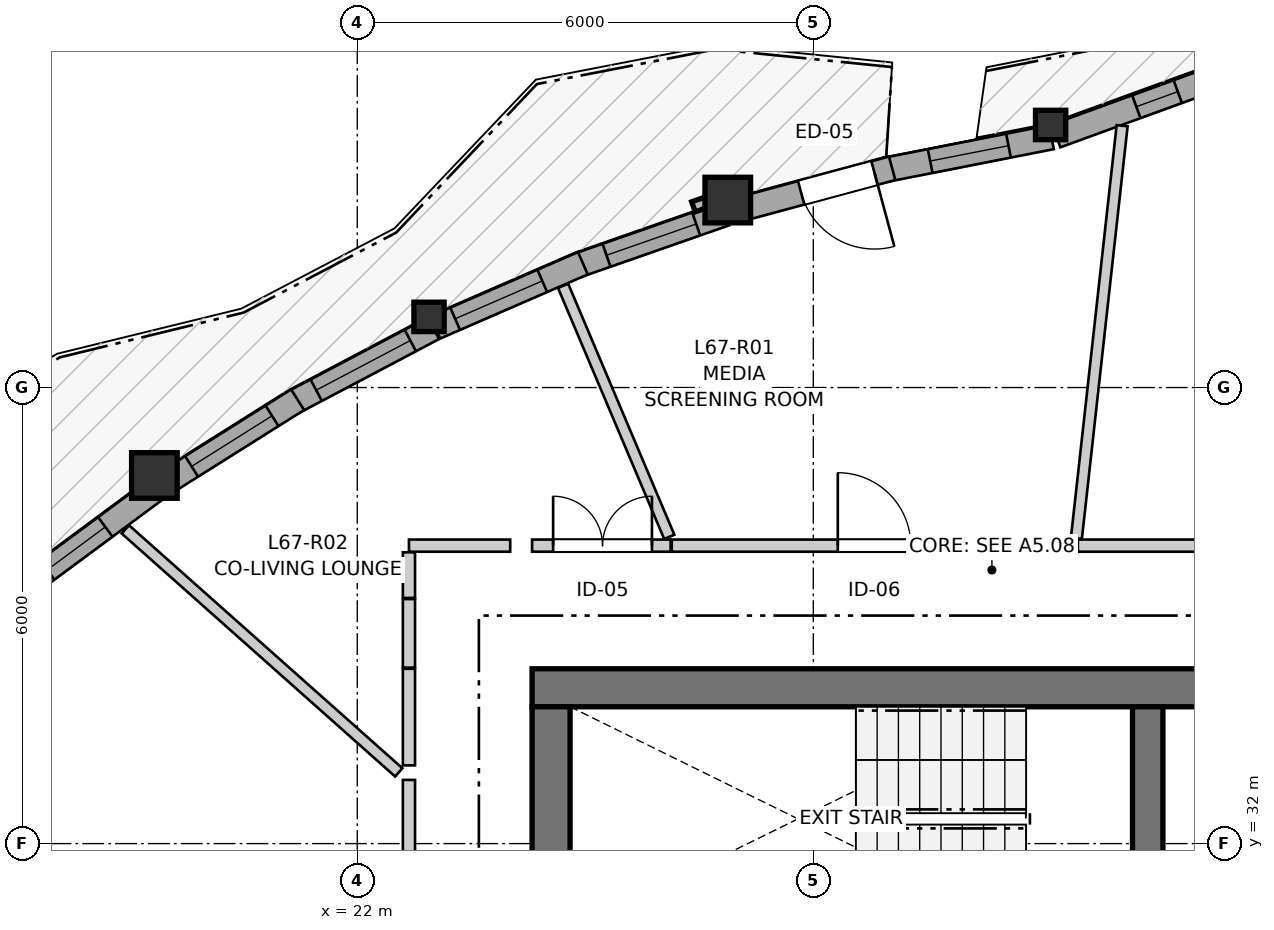
"""IFC4 building model, lengths in metres.
Left out: names, types, materials, properties, quantities, classifications, styles, units other than length and angle.
Written with IfcOpenShell. Run it as: python <this file> out.ifc"""

import sys

from ifc_helpers import new_model, si_unit, direction, frame, frame_2d, origin, origin_2d, place, context, subcontext, project, spatial, rectangle, i_section, extrude, source, transform, mapped, element, fill, save


model = new_model("IFC4")
c1 = context("Model", 3, precision=1e-05, world=origin(), true_north=direction((0.0, 1.0)))
c2 = subcontext(c1, "Body", "Model", "MODEL_VIEW")
j1 = project(units=[si_unit("LENGTHUNIT", "METRE"), si_unit("PLANEANGLEUNIT", "RADIAN")], contexts=[c1])
p1 = place(None, origin())
s1 = spatial("IfcSite", under=j1, at=p1, CompositionType="ELEMENT")
p2 = place(p1, origin())
s2 = spatial("IfcBuilding", under=s1, at=p2, CompositionType="ELEMENT")
p3 = place(p2, frame((0.0, 0.0, 224.4)))
s3 = spatial("IfcBuildingStorey", under=s2, at=p3, CompositionType="ELEMENT", Elevation=224.4)
p4 = place(p3, frame((36.4, 34.05, 0.0), z_axis=(0.0, 0.0, 1.0), x_axis=(-1.0, 0.0, 0.0)))
e1 = element("IfcWall", 1, at=p4, inside=s3, PredefinedType="SHEAR", context=c2, shape_type="SweptSolid", body=[
    extrude(rectangle(XDim=12.1, YDim=0.5, at=frame_2d((6.05, 0.0))), origin(), (0.0, 0.0, 1.0), 2.96),
])
p5 = place(p3, frame((24.55, 33.8, 0.0), z_axis=(0.0, 0.0, 1.0), x_axis=(0.0, -1.0, 0.0)))
e2 = element("IfcWall", 2, at=p5, inside=s3, PredefinedType="SHEAR", context=c2, shape_type="SweptSolid", body=[
    extrude(rectangle(XDim=15.6, YDim=0.5, at=frame_2d((7.8, 0.0))), origin(), (0.0, 0.0, 1.0), 2.96),
])
p6 = place(p5, frame((7.05, 0.0, 0.0)))
e3 = element("IfcOpeningElement", 3, at=p6, cuts=e2, PredefinedType="OPENING", context=c2, shape_type="SweptSolid", body=[
    extrude(rectangle(XDim=1.5, YDim=2.15, at=frame_2d((0.75, 1.075))), frame((0.0, 0.26, 0.0), z_axis=(0.0, -1.0, 0.0), x_axis=(1.0, 0.0, 0.0)), (0.0, 0.0, 1.0), 0.52),
])
p7 = place(p5, frame((3.52, 0.0, 0.0)))
e4 = element("IfcOpeningElement", 4, at=p7, cuts=e2, PredefinedType="OPENING", context=c2, shape_type="SweptSolid", body=[
    extrude(rectangle(XDim=0.86, YDim=2.05, at=frame_2d((0.43, 1.025))), frame((0.0, 0.26, 0.0), z_axis=(0.0, -1.0, 0.0), x_axis=(1.0, 0.0, 0.0)), (0.0, 0.0, 1.0), 0.52),
])
p8 = place(p5, frame((11.22, 0.0, 0.0)))
e5 = element("IfcOpeningElement", 5, at=p8, cuts=e2, PredefinedType="OPENING", context=c2, shape_type="SweptSolid", body=[
    extrude(rectangle(XDim=0.86, YDim=2.05, at=frame_2d((0.43, 1.025))), frame((0.0, 0.26, 0.0), z_axis=(0.0, -1.0, 0.0), x_axis=(1.0, 0.0, 0.0)), (0.0, 0.0, 1.0), 0.52),
])
p9 = place(p3, frame((32.4, 30.85, 0.0), z_axis=(0.0, 0.0, 1.0), x_axis=(0.0, 1.0, 0.0)))
e6 = element("IfcWall", 6, at=p9, inside=s3, PredefinedType="SHEAR", context=c2, shape_type="SweptSolid", body=[
    extrude(rectangle(XDim=2.95, YDim=0.4, at=frame_2d((1.475, 0.0))), origin(), (0.0, 0.0, 1.0), 2.96),
])
m1 = source(origin(), c2, "Body", "SweptSolid", [
    extrude(i_section(OverallWidth=0.398, OverallDepth=0.387, WebThickness=0.019, FlangeThickness=0.03, FilletRadius=0.015, at=origin_2d()), origin(), (0.0, 0.0, 1.0), 2.96),
])
p10 = place(p3, frame((31.123, 41.454, 0.0), z_axis=(0.0, 0.0, 1.0), x_axis=(1.0, 0.0, 0.0)))
e7 = element("IfcColumn", 7, at=p10, inside=s3, PredefinedType="PILASTER", context=c2, shape_type="MappedRepresentation", body=[
    mapped(m1, transform((0.0, 0.0, 0.0), x_axis=(1.0, 0.0, 0.0), y_axis=(0.0, 1.0, 0.0), z_axis=(0.0, 0.0, 1.0), scale=1.0)),
])
m2 = source(origin(), c2, "Body", "SweptSolid", [
    extrude(rectangle(XDim=0.6, YDim=0.6, at=origin_2d()), origin(), (0.0, 0.0, 1.0), 2.96),
])
p11 = place(p3, frame((26.875, 40.467, 0.0), z_axis=(0.0, 0.0, 1.0), x_axis=(1.0, 0.0, 0.0)))
e8 = element("IfcColumn", 8, at=p11, inside=s3, PredefinedType="COLUMN", context=c2, shape_type="MappedRepresentation", body=[
    mapped(m2, transform((0.0, 0.0, 0.0), x_axis=(1.0, 0.0, 0.0), y_axis=(0.0, 1.0, 0.0), z_axis=(0.0, 0.0, 1.0), scale=1.0)),
])
p12 = place(p3, frame((22.944, 38.929, 0.0), z_axis=(0.0, 0.0, 1.0), x_axis=(1.0, 0.0, 0.0)))
e9 = element("IfcColumn", 9, at=p12, inside=s3, PredefinedType="PILASTER", context=c2, shape_type="MappedRepresentation", body=[
    mapped(m1, transform((0.0, 0.0, 0.0), x_axis=(1.0, 0.0, 0.0), y_axis=(0.0, 1.0, 0.0), z_axis=(0.0, 0.0, 1.0), scale=1.0)),
])
p13 = place(p3, frame((19.331, 36.843, 0.0), z_axis=(0.0, 0.0, 1.0), x_axis=(1.0, 0.0, 0.0)))
e10 = element("IfcColumn", 10, at=p13, inside=s3, PredefinedType="COLUMN", context=c2, shape_type="MappedRepresentation", body=[
    mapped(m2, transform((0.0, 0.0, 0.0), x_axis=(1.0, 0.0, 0.0), y_axis=(0.0, 1.0, 0.0), z_axis=(0.0, 0.0, 1.0), scale=1.0)),
])
p14 = place(p3, frame((35.068, 41.983, 0.0), z_axis=(0.0, 0.0, 1.0), x_axis=(-1.0, 0.0, 0.0)))
e11 = element("IfcWall", 11, at=p14, inside=s3, PredefinedType="SOLIDWALL", context=c2, shape_type="SweptSolid", body=[
    extrude(rectangle(XDim=2.09, YDim=0.32, at=frame_2d((1.045, 0.0))), origin(), (0.0, 0.0, 1.0), 2.58),
])
p15 = place(p14, frame((0.37, 0.0, 0.82)))
e12 = element("IfcOpeningElement", 12, at=p15, cuts=e11, PredefinedType="OPENING", context=c2, shape_type="SweptSolid", body=[
    extrude(rectangle(XDim=1.35, YDim=1.45, at=frame_2d((0.675, 0.725))), frame((0.0, 0.17, 0.0), z_axis=(0.0, -1.0, 0.0), x_axis=(1.0, 0.0, 0.0)), (0.0, 0.0, 1.0), 0.34),
])
p16 = place(p3, frame((33.106, 42.006, 0.0), z_axis=(0.0, 0.0, 1.0), x_axis=(-0.939691662178, -0.342022777067, 0.0)))
e13 = element("IfcWall", 13, at=p16, inside=s3, PredefinedType="SOLIDWALL", context=c2, shape_type="SweptSolid", body=[
    extrude(rectangle(XDim=2.032, YDim=0.32, at=frame_2d((1.016, 0.0))), origin(), (0.0, 0.0, 1.0), 2.58),
])
p17 = place(p16, frame((0.33, 0.0, 0.82)))
e14 = element("IfcOpeningElement", 14, at=p17, cuts=e13, PredefinedType="OPENING", context=c2, shape_type="SweptSolid", body=[
    extrude(rectangle(XDim=0.58, YDim=1.35, at=frame_2d((0.29, 0.675))), frame((0.0, 0.17, 0.0), z_axis=(0.0, -1.0, 0.0), x_axis=(1.0, 0.0, 0.0)), (0.0, 0.0, 1.0), 0.34),
])
p18 = place(p3, frame((31.134, 41.293, 0.0), z_axis=(0.0, 0.0, 1.0), x_axis=(-0.981246594798, -0.19275663464, 0.0)))
e15 = element("IfcWall", 15, at=p18, inside=s3, PredefinedType="SOLIDWALL", context=c2, shape_type="SweptSolid", body=[
    extrude(rectangle(XDim=2.223, YDim=0.32, at=frame_2d((1.111, 0.0))), origin(), (0.0, 0.0, 1.0), 2.58),
])
p19 = place(p18, frame((0.576, 0.0, 0.82)))
e16 = element("IfcOpeningElement", 16, at=p19, cuts=e15, PredefinedType="OPENING", context=c2, shape_type="SweptSolid", body=[
    extrude(rectangle(XDim=1.05, YDim=1.45, at=frame_2d((0.525, 0.725))), frame((0.0, 0.17, 0.0), z_axis=(0.0, -1.0, 0.0), x_axis=(1.0, 0.0, 0.0)), (0.0, 0.0, 1.0), 0.34),
])
p20 = place(p3, frame((29.037, 40.885, 0.0), z_axis=(0.0, 0.0, 1.0), x_axis=(-0.965439872052, -0.260625887918, 0.0)))
e17 = element("IfcWall", 17, at=p20, inside=s3, PredefinedType="SOLIDWALL", context=c2, shape_type="SweptSolid", body=[
    extrude(rectangle(XDim=2.107, YDim=0.32, at=frame_2d((1.053, 0.0))), origin(), (0.0, 0.0, 1.0), 2.58),
])
p21 = place(p20, frame((0.24, 0.0, 0.0)))
e18 = element("IfcOpeningElement", 18, at=p21, cuts=e17, PredefinedType="OPENING", context=c2, shape_type="SweptSolid", body=[
    extrude(rectangle(XDim=1.0, YDim=2.1, at=frame_2d((0.5, 1.05))), frame((0.0, 0.17, 0.0), z_axis=(0.0, -1.0, 0.0), x_axis=(1.0, 0.0, 0.0)), (0.0, 0.0, 1.0), 0.34),
])
p22 = place(p3, frame((26.843, 40.286, 0.0), z_axis=(0.0, 0.0, 1.0), x_axis=(-0.944109796758, -0.329631144867, 0.0)))
e19 = element("IfcWall", 19, at=p22, inside=s3, PredefinedType="SOLIDWALL", context=c2, shape_type="SweptSolid", body=[
    extrude(rectangle(XDim=2.072, YDim=0.32, at=frame_2d((1.036, 0.0))), origin(), (0.0, 0.0, 1.0), 2.58),
])
p23 = place(p22, frame((0.406, 0.0, 0.82)))
e20 = element("IfcOpeningElement", 20, at=p23, cuts=e19, PredefinedType="OPENING", context=c2, shape_type="SweptSolid", body=[
    extrude(rectangle(XDim=1.25, YDim=1.35, at=frame_2d((0.625, 0.675))), frame((0.0, 0.17, 0.0), z_axis=(0.0, -1.0, 0.0), x_axis=(1.0, 0.0, 0.0)), (0.0, 0.0, 1.0), 0.34),
])
p24 = place(p3, frame((24.969, 39.635, 0.0), z_axis=(0.0, 0.0, 1.0), x_axis=(-0.917099379281, -0.398658661666, 0.0)))
e21 = element("IfcWall", 21, at=p24, inside=s3, PredefinedType="SOLIDWALL", context=c2, shape_type="SweptSolid", body=[
    extrude(rectangle(XDim=2.118, YDim=0.32, at=frame_2d((1.059, 0.0))), origin(), (0.0, 0.0, 1.0), 2.58),
])
p25 = place(p24, frame((0.582, 0.0, 0.82)))
e22 = element("IfcOpeningElement", 22, at=p25, cuts=e21, PredefinedType="OPENING", context=c2, shape_type="SweptSolid", body=[
    extrude(rectangle(XDim=1.25, YDim=1.35, at=frame_2d((0.625, 0.675))), frame((0.0, 0.17, 0.0), z_axis=(0.0, -1.0, 0.0), x_axis=(1.0, 0.0, 0.0)), (0.0, 0.0, 1.0), 0.34),
])
p26 = place(p3, frame((23.001, 38.779, 0.0), z_axis=(0.0, 0.0, 1.0), x_axis=(-0.884379435148, -0.466768695059, 0.0)))
e23 = element("IfcWall", 23, at=p26, inside=s3, PredefinedType="SOLIDWALL", context=c2, shape_type="SweptSolid", body=[
    extrude(rectangle(XDim=2.106, YDim=0.32, at=frame_2d((1.053, 0.0))), origin(), (0.0, 0.0, 1.0), 2.58),
])
p27 = place(p26, frame((0.343, 0.0, 0.82)))
e24 = element("IfcOpeningElement", 24, at=p27, cuts=e23, PredefinedType="OPENING", context=c2, shape_type="SweptSolid", body=[
    extrude(rectangle(XDim=1.4, YDim=1.35, at=frame_2d((0.7, 0.675))), frame((0.0, 0.17, 0.0), z_axis=(0.0, -1.0, 0.0), x_axis=(1.0, 0.0, 0.0)), (0.0, 0.0, 1.0), 0.34),
])
p28 = place(p3, frame((21.215, 37.84, 0.0), z_axis=(0.0, 0.0, 1.0), x_axis=(-0.846356989859, -0.532616039672, 0.0)))
e25 = element("IfcWall", 25, at=p28, inside=s3, PredefinedType="SOLIDWALL", context=c2, shape_type="SweptSolid", body=[
    extrude(rectangle(XDim=2.036, YDim=0.32, at=frame_2d((1.018, 0.0))), origin(), (0.0, 0.0, 1.0), 2.58),
])
p29 = place(p28, frame((0.398, 0.0, 0.82)))
e26 = element("IfcOpeningElement", 26, at=p29, cuts=e25, PredefinedType="OPENING", context=c2, shape_type="SweptSolid", body=[
    extrude(rectangle(XDim=1.25, YDim=1.35, at=frame_2d((0.625, 0.675))), frame((0.0, 0.17, 0.0), z_axis=(0.0, -1.0, 0.0), x_axis=(1.0, 0.0, 0.0)), (0.0, 0.0, 1.0), 0.34),
])
p30 = place(p3, frame((19.354, 36.661, 0.0), z_axis=(0.0, 0.0, 1.0), x_axis=(-0.803846460046, -0.59483684206, 0.0)))
e27 = element("IfcWall", 27, at=p30, inside=s3, PredefinedType="SOLIDWALL", context=c2, shape_type="SweptSolid", body=[
    extrude(rectangle(XDim=2.048, YDim=0.32, at=frame_2d((1.024, 0.0))), origin(), (0.0, 0.0, 1.0), 2.58),
])
p31 = place(p30, frame((0.832, 0.0, 0.82)))
e28 = element("IfcOpeningElement", 28, at=p31, cuts=e27, PredefinedType="OPENING", context=c2, shape_type="SweptSolid", body=[
    extrude(rectangle(XDim=0.95, YDim=1.35, at=frame_2d((0.475, 0.675))), frame((0.0, 0.17, 0.0), z_axis=(0.0, -1.0, 0.0), x_axis=(1.0, 0.0, 0.0)), (0.0, 0.0, 1.0), 0.34),
])
p32 = place(p3, frame((26.138, 35.92, 0.0), z_axis=(0.0, 0.0, 1.0), x_axis=(1.0, 0.0, 0.0)))
e29 = element("IfcWall", 29, at=p32, inside=s3, PredefinedType="PARTITIONING", context=c2, shape_type="SweptSolid", body=[
    extrude(rectangle(XDim=5.328, YDim=0.16, at=frame_2d((2.664, 0.0))), origin(), (0.0, 0.0, 1.0), 2.96),
])
p33 = place(p32, frame((2.185, 0.0, 0.0)))
e30 = element("IfcOpeningElement", 30, at=p33, cuts=e29, PredefinedType="OPENING", context=c2, shape_type="SweptSolid", body=[
    extrude(rectangle(XDim=0.96, YDim=2.1, at=frame_2d((0.48, 1.05))), frame((0.0, 0.09, 0.0), z_axis=(0.0, -1.0, 0.0), x_axis=(1.0, 0.0, 0.0)), (0.0, 0.0, 1.0), 0.18),
])
p34 = place(p3, frame((22.68, 27.85, 0.0), z_axis=(0.0, 0.0, 1.0), x_axis=(0.0, 1.0, 0.0)))
e31 = element("IfcWall", 31, at=p34, inside=s3, PredefinedType="PARTITIONING", context=c2, shape_type="SweptSolid", body=[
    extrude(rectangle(XDim=4.988, YDim=0.16, at=frame_2d((2.494, 0.0))), origin(), (0.0, 0.0, 1.0), 2.96),
])
p35 = place(p34, frame((2.033, 0.0, 0.0)))
e32 = element("IfcOpeningElement", 32, at=p35, cuts=e31, PredefinedType="OPENING", context=c2, shape_type="SweptSolid", body=[
    extrude(rectangle(XDim=0.96, YDim=2.1, at=frame_2d((0.48, 1.05))), frame((0.0, 0.09, 0.0), z_axis=(0.0, -1.0, 0.0), x_axis=(1.0, 0.0, 0.0)), (0.0, 0.0, 1.0), 0.18),
])
p36 = place(p3, frame((31.481, 35.92, 0.0), z_axis=(0.0, 0.0, 1.0), x_axis=(1.0, 0.0, 0.0)))
e33 = element("IfcWall", 33, at=p36, inside=s3, PredefinedType="PARTITIONING", context=c2, shape_type="SweptSolid", body=[
    extrude(rectangle(XDim=4.919, YDim=0.16, at=frame_2d((2.459, 0.0))), origin(), (0.0, 0.0, 1.0), 2.598),
])
p37 = place(p36, frame((1.965, 0.0, 0.0)))
e34 = element("IfcOpeningElement", 34, at=p37, cuts=e33, PredefinedType="OPENING", context=c2, shape_type="SweptSolid", body=[
    extrude(rectangle(XDim=0.96, YDim=2.1, at=frame_2d((0.48, 1.05))), frame((0.0, 0.09, 0.0), z_axis=(0.0, -1.0, 0.0), x_axis=(1.0, 0.0, 0.0)), (0.0, 0.0, 1.0), 0.18),
])
p38 = place(p3, frame((24.3, 35.92, 0.0), z_axis=(0.0, 0.0, 1.0), x_axis=(1.0, 0.0, 0.0)))
e35 = element("IfcWall", 35, at=p38, inside=s3, PredefinedType="PARTITIONING", context=c2, shape_type="SweptSolid", body=[
    extrude(rectangle(XDim=1.823, YDim=0.16, at=frame_2d((0.912, 0.0))), origin(), (0.0, 0.0, 1.0), 2.96),
])
p39 = place(p38, frame((0.277, 0.0, 0.0)))
e36 = element("IfcOpeningElement", 36, at=p39, cuts=e35, PredefinedType="OPENING", context=c2, shape_type="SweptSolid", body=[
    extrude(rectangle(XDim=1.3, YDim=2.1, at=frame_2d((0.65, 1.05))), frame((0.0, 0.09, 0.0), z_axis=(0.0, -1.0, 0.0), x_axis=(1.0, 0.0, 0.0)), (0.0, 0.0, 1.0), 0.18),
])
p40 = place(p3, frame((31.462, 36.016, 0.0), z_axis=(0.0, 0.0, 1.0), x_axis=(0.11018132109, 0.993911503346, 0.0)))
e37 = element("IfcWall", 37, at=p40, inside=s3, PredefinedType="PARTITIONING", context=c2, shape_type="SweptSolid", body=[
    extrude(rectangle(XDim=5.462, YDim=0.145, at=frame_2d((2.731, 0.0))), origin(), (0.0, 0.0, 1.0), 2.96),
])
p41 = place(p3, frame((18.949, 36.134, 0.0), z_axis=(0.0, 0.0, 1.0), x_axis=(0.747482088067, -0.664281964243, 0.0)))
e38 = element("IfcWall", 38, at=p41, inside=s3, PredefinedType="PARTITIONING", context=c2, shape_type="SweptSolid", body=[
    extrude(rectangle(XDim=4.812, YDim=0.145, at=frame_2d((2.406, 0.0))), origin(), (0.0, 0.0, 1.0), 2.96),
])
p42 = place(p3, frame((24.708, 39.338, 0.0), z_axis=(0.0, 0.0, 1.0), x_axis=(0.389551136954, -0.921004838043, 0.0)))
e39 = element("IfcWall", 39, at=p42, inside=s3, PredefinedType="PARTITIONING", context=c2, shape_type="SweptSolid", body=[
    extrude(rectangle(XDim=3.585, YDim=0.145, at=frame_2d((1.793, 0.0))), origin(), (0.0, 0.0, 1.0), 2.96),
])
p43 = place(p3, frame((22.68, 33.029, 0.0), z_axis=(0.0, 0.0, 1.0), x_axis=(0.0, 1.0, 0.0)))
e40 = element("IfcWall", 40, at=p43, inside=s3, PredefinedType="PARTITIONING", context=c2, shape_type="SweptSolid", body=[
    extrude(rectangle(XDim=1.271, YDim=0.16, at=frame_2d((0.635, 0.0))), origin(), (0.0, 0.0, 1.0), 2.628),
])
p44 = place(p3, frame((22.68, 35.92, 0.0), z_axis=(0.0, 0.0, 1.0), x_axis=(1.0, 0.0, 0.0)))
e41 = element("IfcWall", 41, at=p44, inside=s3, PredefinedType="PARTITIONING", context=c2, shape_type="SweptSolid", body=[
    extrude(rectangle(XDim=1.332, YDim=0.16, at=frame_2d((0.666, 0.0))), origin(), (0.0, 0.0, 1.0), 2.96),
])
p45 = place(p3, frame((22.68, 34.315, 0.0), z_axis=(0.0, 0.0, 1.0), x_axis=(0.0, 1.0, 0.0)))
e42 = element("IfcWall", 42, at=p45, inside=s3, PredefinedType="PARTITIONING", context=c2, shape_type="SweptSolid", body=[
    extrude(rectangle(XDim=0.902, YDim=0.16, at=frame_2d((0.451, 0.0))), origin(), (0.0, 0.0, 1.0), 2.96),
])
p46 = place(p3, frame((22.68, 35.232, 0.0), z_axis=(0.0, 0.0, 1.0), x_axis=(0.0, 1.0, 0.0)))
e43 = element("IfcWall", 43, at=p46, inside=s3, PredefinedType="PARTITIONING", context=c2, shape_type="SweptSolid", body=[
    extrude(rectangle(XDim=0.6, YDim=0.16, at=frame_2d((0.3, 0.0))), origin(), (0.0, 0.0, 1.0), 2.96),
])
m3 = source(origin(), c2, "Body", "SweptSolid", [
    extrude(rectangle(XDim=0.58, YDim=1.35, at=frame_2d((0.29, 0.675))), frame((0.0, 0.03, 0.0), z_axis=(0.0, -1.0, 0.0), x_axis=(1.0, 0.0, 0.0)), (0.0, 0.0, 1.0), 0.06),
])
p47 = place(p17, origin())
e44 = element("IfcWindow", 44, at=p47, inside=s3, PartitioningType="SINGLE_PANEL", PredefinedType="WINDOW", context=c2, shape_type="MappedRepresentation", body=[
    mapped(m3, transform((0.0, 0.0, 0.0), x_axis=(1.0, 0.0, 0.0), y_axis=(0.0, 1.0, 0.0), z_axis=(0.0, 0.0, 1.0), scale=1.0)),
])
fill(e14, e44)
m4 = source(origin(), c2, "Body", "SweptSolid", [
    extrude(rectangle(XDim=1.05, YDim=1.45, at=frame_2d((0.525, 0.725))), frame((0.0, 0.03, 0.0), z_axis=(0.0, -1.0, 0.0), x_axis=(1.0, 0.0, 0.0)), (0.0, 0.0, 1.0), 0.06),
])
p48 = place(p19, origin())
e45 = element("IfcWindow", 45, at=p48, inside=s3, PartitioningType="SINGLE_PANEL", PredefinedType="WINDOW", context=c2, shape_type="MappedRepresentation", body=[
    mapped(m4, transform((0.0, 0.0, 0.0), x_axis=(1.0, 0.0, 0.0), y_axis=(0.0, 1.0, 0.0), z_axis=(0.0, 0.0, 1.0), scale=1.0)),
])
fill(e16, e45)
m5 = source(origin(), c2, "Body", "SweptSolid", [
    extrude(rectangle(XDim=1.25, YDim=1.35, at=frame_2d((0.625, 0.675))), frame((0.0, 0.03, 0.0), z_axis=(0.0, -1.0, 0.0), x_axis=(1.0, 0.0, 0.0)), (0.0, 0.0, 1.0), 0.06),
])
p49 = place(p23, origin())
e46 = element("IfcWindow", 46, at=p49, inside=s3, PartitioningType="SINGLE_PANEL", PredefinedType="WINDOW", context=c2, shape_type="MappedRepresentation", body=[
    mapped(m5, transform((0.0, 0.0, 0.0), x_axis=(1.0, 0.0, 0.0), y_axis=(0.0, 1.0, 0.0), z_axis=(0.0, 0.0, 1.0), scale=1.0)),
])
fill(e20, e46)
p50 = place(p25, origin())
e47 = element("IfcWindow", 47, at=p50, inside=s3, PartitioningType="SINGLE_PANEL", PredefinedType="WINDOW", context=c2, shape_type="MappedRepresentation", body=[
    mapped(m5, transform((0.0, 0.0, 0.0), x_axis=(1.0, 0.0, 0.0), y_axis=(0.0, 1.0, 0.0), z_axis=(0.0, 0.0, 1.0), scale=1.0)),
])
fill(e22, e47)
m6 = source(origin(), c2, "Body", "SweptSolid", [
    extrude(rectangle(XDim=1.4, YDim=1.35, at=frame_2d((0.7, 0.675))), frame((0.0, 0.03, 0.0), z_axis=(0.0, -1.0, 0.0), x_axis=(1.0, 0.0, 0.0)), (0.0, 0.0, 1.0), 0.06),
])
p51 = place(p27, origin())
e48 = element("IfcWindow", 48, at=p51, inside=s3, PartitioningType="SINGLE_PANEL", PredefinedType="WINDOW", context=c2, shape_type="MappedRepresentation", body=[
    mapped(m6, transform((0.0, 0.0, 0.0), x_axis=(1.0, 0.0, 0.0), y_axis=(0.0, 1.0, 0.0), z_axis=(0.0, 0.0, 1.0), scale=1.0)),
])
fill(e24, e48)
p52 = place(p29, origin())
e49 = element("IfcWindow", 49, at=p52, inside=s3, PartitioningType="SINGLE_PANEL", PredefinedType="WINDOW", context=c2, shape_type="MappedRepresentation", body=[
    mapped(m5, transform((0.0, 0.0, 0.0), x_axis=(1.0, 0.0, 0.0), y_axis=(0.0, 1.0, 0.0), z_axis=(0.0, 0.0, 1.0), scale=1.0)),
])
fill(e26, e49)
m7 = source(origin(), c2, "Body", "SweptSolid", [
    extrude(rectangle(XDim=0.95, YDim=1.35, at=frame_2d((0.475, 0.675))), frame((0.0, 0.03, 0.0), z_axis=(0.0, -1.0, 0.0), x_axis=(1.0, 0.0, 0.0)), (0.0, 0.0, 1.0), 0.06),
])
p53 = place(p31, origin())
e50 = element("IfcWindow", 50, at=p53, inside=s3, PartitioningType="SINGLE_PANEL", PredefinedType="WINDOW", context=c2, shape_type="MappedRepresentation", body=[
    mapped(m7, transform((0.0, 0.0, 0.0), x_axis=(1.0, 0.0, 0.0), y_axis=(0.0, 1.0, 0.0), z_axis=(0.0, 0.0, 1.0), scale=1.0)),
])
fill(e28, e50)
m8 = source(origin(), c2, "Body", "SweptSolid", [
    extrude(rectangle(XDim=1.0, YDim=2.1, at=frame_2d((0.5, 1.05))), frame((0.0, 0.025, 0.0), z_axis=(0.0, -1.0, 0.0), x_axis=(1.0, 0.0, 0.0)), (0.0, 0.0, 1.0), 0.05),
])
p54 = place(p21, origin())
e51 = element("IfcDoor", 51, at=p54, inside=s3, OperationType="SINGLE_SWING_LEFT", PredefinedType="DOOR", context=c2, shape_type="MappedRepresentation", body=[
    mapped(m8, transform((0.0, 0.0, 0.0), x_axis=(1.0, 0.0, 0.0), y_axis=(0.0, 1.0, 0.0), z_axis=(0.0, 0.0, 1.0), scale=1.0)),
])
fill(e18, e51)
m9 = source(origin(), c2, "Body", "SweptSolid", [
    extrude(rectangle(XDim=0.96, YDim=2.1, at=frame_2d((0.48, 1.05))), frame((0.0, 0.025, 0.0), z_axis=(0.0, -1.0, 0.0), x_axis=(1.0, 0.0, 0.0)), (0.0, 0.0, 1.0), 0.05),
])
p55 = place(p33, origin())
e52 = element("IfcDoor", 52, at=p55, inside=s3, OperationType="SINGLE_SWING_LEFT", PredefinedType="DOOR", context=c2, shape_type="MappedRepresentation", body=[
    mapped(m9, transform((0.0, 0.0, 0.0), x_axis=(1.0, 0.0, 0.0), y_axis=(0.0, 1.0, 0.0), z_axis=(0.0, 0.0, 1.0), scale=1.0)),
])
fill(e30, e52)
m10 = source(origin(), c2, "Body", "SweptSolid", [
    extrude(rectangle(XDim=1.3, YDim=2.1, at=frame_2d((0.65, 1.05))), frame((0.0, 0.025, 0.0), z_axis=(0.0, -1.0, 0.0), x_axis=(1.0, 0.0, 0.0)), (0.0, 0.0, 1.0), 0.05),
])
p56 = place(p39, origin())
e53 = element("IfcDoor", 53, at=p56, inside=s3, OperationType="DOUBLE_DOOR_SINGLE_SWING", PredefinedType="DOOR", context=c2, shape_type="MappedRepresentation", body=[
    mapped(m10, transform((0.0, 0.0, 0.0), x_axis=(1.0, 0.0, 0.0), y_axis=(0.0, 1.0, 0.0), z_axis=(0.0, 0.0, 1.0), scale=1.0)),
])
fill(e36, e53)
save(model, sys.argv[1])
